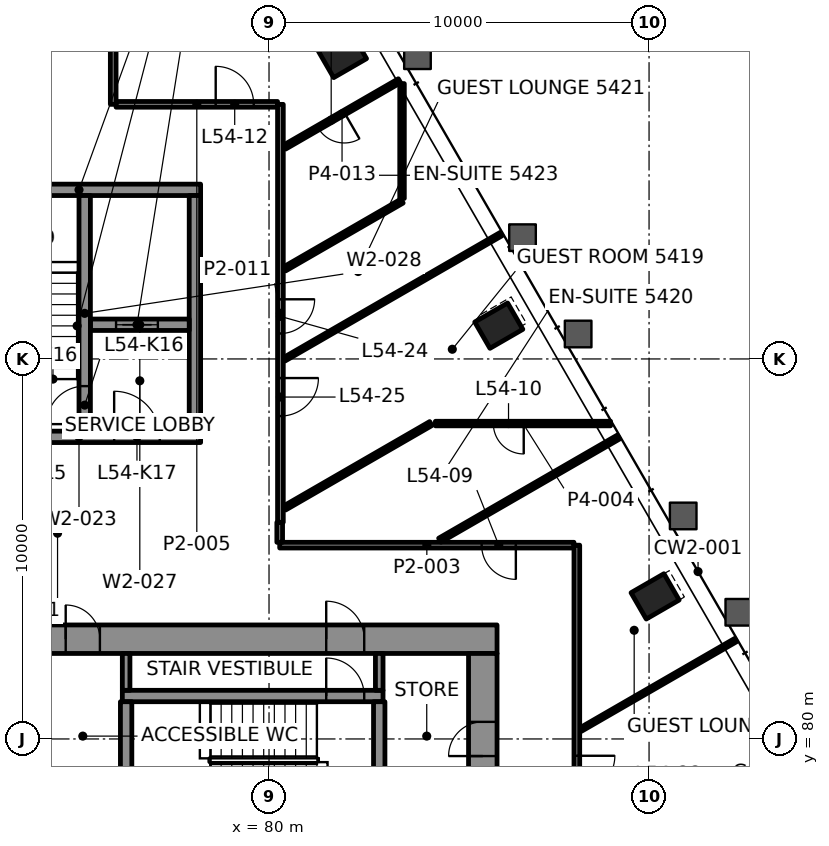
"""IFC4 building model, lengths in metres.
Left out: names, types, materials, properties, quantities, classifications, styles, units other than length and angle.
Written with IfcOpenShell. Run it as: python <this file> out.ifc"""

import sys

from ifc_helpers import new_model, si_unit, direction, frame, frame_2d, origin, origin_2d, place, context, subcontext, project, spatial, rectangle, hollow_rectangle, extrude, element, fill, save


model = new_model("IFC4")
c1 = context("Model", 3, precision=1e-05, world=origin(), true_north=direction((0.0, 1.0)))
c2 = subcontext(c1, "Body", "Model", "MODEL_VIEW")
j1 = project(units=[si_unit("LENGTHUNIT", "METRE"), si_unit("PLANEANGLEUNIT", "RADIAN")], contexts=[c1])
p1 = place(None, origin())
s1 = spatial("IfcSite", under=j1, at=p1, CompositionType="ELEMENT")
p2 = place(p1, origin())
s2 = spatial("IfcBuilding", under=s1, at=p2, CompositionType="ELEMENT")
p3 = place(p2, frame((0.0, 0.0, 229.9)))
s3 = spatial("IfcBuildingStorey", under=s2, at=p3, CompositionType="ELEMENT", Elevation=229.9)
for number, where, z_axis, x_axis in (
    (1, (90.159, 83.752, -0.0), (0.0, 0.0, 1.0), (-0.5, 0.866, 0.0)),
    (2, (86.046, 90.875, -0.0), (0.0, 0.0, 1.0), (-0.5, 0.866, 0.0)),
    (3, (81.933, 97.999, -0.0), (0.0, 0.0, 1.0), (-0.5, 0.866, 0.0)),
):
    element("IfcColumn", number, at=place(p3, frame(where, z_axis=z_axis, x_axis=x_axis)), inside=s3, PredefinedType="COLUMN", context=c2, shape_type="SweptSolid", body=[
        extrude(hollow_rectangle(XDim=0.8, YDim=1.0, WallThickness=0.05, at=origin_2d()), origin(), (0.0, 0.0, 1.0), 3.9),
    ])
p4 = place(p3, frame((64.0, 82.625, 0.0), z_axis=(0.0, 0.0, 1.0), x_axis=(1.0, 0.0, 0.0)))
e4 = element("IfcWall", 4, at=p4, inside=s3, PredefinedType="SHEAR", context=c2, shape_type="SweptSolid", body=[
    extrude(rectangle(XDim=22.0, YDim=0.75, at=frame_2d((11.0, 0.0))), origin(), (0.0, 0.0, 1.0), 3.7),
])
p5 = place(p4, frame((3.695, 0.0, 0.0)))
e5 = element("IfcOpeningElement", 5, at=p5, cuts=e4, PredefinedType="OPENING", context=c2, shape_type="SweptSolid", body=[
    extrude(rectangle(XDim=1.0, YDim=2.1, at=frame_2d((0.5, 1.05))), frame((0.0, 0.385, 0.0), z_axis=(0.0, -1.0, 0.0), x_axis=(1.0, 0.0, 0.0)), (0.0, 0.0, 1.0), 0.77),
])
p6 = place(p4, frame((17.505, 0.0, 0.0)))
e6 = element("IfcOpeningElement", 6, at=p6, cuts=e4, PredefinedType="OPENING", context=c2, shape_type="SweptSolid", body=[
    extrude(rectangle(XDim=1.0, YDim=2.1, at=frame_2d((0.5, 1.05))), frame((0.0, 0.385, 0.0), z_axis=(0.0, -1.0, 0.0), x_axis=(1.0, 0.0, 0.0)), (0.0, 0.0, 1.0), 0.77),
])
p7 = place(p4, frame((10.65, 0.0, 0.0)))
e7 = element("IfcOpeningElement", 7, at=p7, cuts=e4, PredefinedType="OPENING", context=c2, shape_type="SweptSolid", body=[
    extrude(rectangle(XDim=0.9, YDim=2.1, at=frame_2d((0.45, 1.05))), frame((0.0, 0.385, 0.0), z_axis=(0.0, -1.0, 0.0), x_axis=(1.0, 0.0, 0.0)), (0.0, 0.0, 1.0), 0.77),
])
p8 = place(p3, frame((85.625, 67.75, 0.0), z_axis=(0.0, 0.0, 1.0), x_axis=(0.0, 1.0, 0.0)))
e8 = element("IfcWall", 8, at=p8, inside=s3, PredefinedType="SHEAR", context=c2, shape_type="SweptSolid", body=[
    extrude(rectangle(XDim=14.5, YDim=0.75, at=frame_2d((7.25, 0.0))), origin(), (0.0, 0.0, 1.0), 3.7),
])
p9 = place(p8, frame((4.65, 0.0, 0.0)))
e9 = element("IfcOpeningElement", 9, at=p9, cuts=e8, PredefinedType="OPENING", context=c2, shape_type="SweptSolid", body=[
    extrude(rectangle(XDim=1.8, YDim=2.1, at=frame_2d((0.9, 1.05))), frame((0.0, 0.385, 0.0), z_axis=(0.0, -1.0, 0.0), x_axis=(1.0, 0.0, 0.0)), (0.0, 0.0, 1.0), 0.77),
])
p10 = place(p8, frame((11.8, 0.0, 0.0)))
e10 = element("IfcOpeningElement", 10, at=p10, cuts=e8, PredefinedType="OPENING", context=c2, shape_type="SweptSolid", body=[
    extrude(rectangle(XDim=0.9, YDim=2.1, at=frame_2d((0.45, 1.05))), frame((0.0, 0.385, 0.0), z_axis=(0.0, -1.0, 0.0), x_axis=(1.0, 0.0, 0.0)), (0.0, 0.0, 1.0), 0.77),
])
p11 = place(p3, frame((76.14, 81.13, 0.0), z_axis=(0.0, 0.0, 1.0), x_axis=(1.0, 0.0, 0.0)))
e11 = element("IfcWall", 11, at=p11, inside=s3, PredefinedType="SHEAR", context=c2, shape_type="SweptSolid", body=[
    extrude(rectangle(XDim=6.86, YDim=0.3, at=frame_2d((3.43, 0.0))), origin(), (0.0, 0.0, 1.0), 3.7),
])
p12 = place(p11, frame((5.365, 0.0, 0.0)))
e12 = element("IfcOpeningElement", 12, at=p12, cuts=e11, PredefinedType="OPENING", context=c2, shape_type="SweptSolid", body=[
    extrude(rectangle(XDim=1.0, YDim=2.1, at=frame_2d((0.5, 1.05))), frame((0.0, 0.16, 0.0), z_axis=(0.0, -1.0, 0.0), x_axis=(1.0, 0.0, 0.0)), (0.0, 0.0, 1.0), 0.32),
])
for number, where, z_axis, x_axis in (
    (13, (76.24, 77.9, 0.0), (0.0, 0.0, 1.0), (0.0, 1.0, 0.0)),
    (14, (82.9, 77.9, 0.0), (0.0, 0.0, 1.0), (0.0, 1.0, 0.0)),
):
    element("IfcWall", number, at=place(p3, frame(where, z_axis=z_axis, x_axis=x_axis)), inside=s3, PredefinedType="SHEAR", context=c2, shape_type="SweptSolid", body=[
        extrude(rectangle(XDim=3.08, YDim=0.3, at=frame_2d((1.54, 0.0))), origin(), (0.0, 0.0, 1.0), 3.7),
    ])
p13 = place(p3, frame((71.8, 87.95, 0.0), z_axis=(0.0, 0.0, 1.0), x_axis=(1.0, 0.0, 0.0)))
e15 = element("IfcWall", 15, at=p13, inside=s3, PredefinedType="SHEAR", context=c2, shape_type="SweptSolid", body=[
    extrude(rectangle(XDim=6.4, YDim=0.3, at=frame_2d((3.2, 0.0))), origin(), (0.0, 0.0, 1.0), 3.7),
])
p14 = place(p13, frame((1.325, 0.0, 0.0)))
e16 = element("IfcOpeningElement", 16, at=p14, cuts=e15, PredefinedType="OPENING", context=c2, shape_type="SweptSolid", body=[
    extrude(rectangle(XDim=1.0, YDim=2.1, at=frame_2d((0.5, 1.05))), frame((0.0, 0.16, 0.0), z_axis=(0.0, -1.0, 0.0), x_axis=(1.0, 0.0, 0.0)), (0.0, 0.0, 1.0), 0.32),
])
p15 = place(p13, frame((4.125, 0.0, 0.0)))
e17 = element("IfcOpeningElement", 17, at=p15, cuts=e15, PredefinedType="OPENING", context=c2, shape_type="SweptSolid", body=[
    extrude(rectangle(XDim=1.2, YDim=2.1, at=frame_2d((0.6, 1.05))), frame((0.0, 0.16, 0.0), z_axis=(0.0, -1.0, 0.0), x_axis=(1.0, 0.0, 0.0)), (0.0, 0.0, 1.0), 0.32),
])
p16 = place(p3, frame((71.8, 94.45, 0.0), z_axis=(0.0, 0.0, 1.0), x_axis=(1.0, 0.0, 0.0)))
e18 = element("IfcWall", 18, at=p16, inside=s3, PredefinedType="SHEAR", context=c2, shape_type="SweptSolid", body=[
    extrude(rectangle(XDim=6.4, YDim=0.3, at=frame_2d((3.2, 0.0))), origin(), (0.0, 0.0, 1.0), 3.7),
])
p17 = place(p3, frame((78.05, 88.1, 0.0), z_axis=(0.0, 0.0, 1.0), x_axis=(0.0, 1.0, 0.0)))
e19 = element("IfcWall", 19, at=p17, inside=s3, PredefinedType="SHEAR", context=c2, shape_type="SweptSolid", body=[
    extrude(rectangle(XDim=6.2, YDim=0.3, at=frame_2d((3.1, 0.0))), origin(), (0.0, 0.0, 1.0), 3.7),
])
p18 = place(p3, frame((75.3, 90.9, 0.0), z_axis=(0.0, 0.0, 1.0), x_axis=(1.0, 0.0, 0.0)))
e20 = element("IfcWall", 20, at=p18, inside=s3, PredefinedType="SHEAR", context=c2, shape_type="SweptSolid", body=[
    extrude(rectangle(XDim=2.6, YDim=0.3, at=frame_2d((1.3, 0.0))), origin(), (0.0, 0.0, 1.0), 3.7),
])
p19 = place(p18, frame((0.675, 0.0, 0.0)))
e21 = element("IfcOpeningElement", 21, at=p19, cuts=e20, PredefinedType="OPENING", context=c2, shape_type="SweptSolid", body=[
    extrude(rectangle(XDim=1.1, YDim=2.1, at=frame_2d((0.55, 1.05))), frame((0.0, 0.16, 0.0), z_axis=(0.0, -1.0, 0.0), x_axis=(1.0, 0.0, 0.0)), (0.0, 0.0, 1.0), 0.32),
])
p20 = place(p3, frame((75.15, 88.1, 0.0), z_axis=(0.0, 0.0, 1.0), x_axis=(0.0, 1.0, 0.0)))
e22 = element("IfcWall", 22, at=p20, inside=s3, PredefinedType="SHEAR", context=c2, shape_type="SweptSolid", body=[
    extrude(rectangle(XDim=6.2, YDim=0.3, at=frame_2d((3.1, 0.0))), origin(), (0.0, 0.0, 1.0), 3.7),
])
p21 = place(p20, frame((0.185, 0.0, 0.0)))
e23 = element("IfcOpeningElement", 23, at=p21, cuts=e22, PredefinedType="OPENING", context=c2, shape_type="SweptSolid", body=[
    extrude(rectangle(XDim=1.0, YDim=2.1, at=frame_2d((0.5, 1.05))), frame((0.0, 0.16, 0.0), z_axis=(0.0, -1.0, 0.0), x_axis=(1.0, 0.0, 0.0)), (0.0, 0.0, 1.0), 0.32),
])
p22 = place(p3, frame((88.024, 85.1, 0.0), z_axis=(0.0, 0.0, 1.0), x_axis=(-1.0, 0.0, 0.0)))
e24 = element("IfcWall", 24, at=p22, inside=s3, PredefinedType="PARTITIONING", context=c2, shape_type="SweptSolid", body=[
    extrude(rectangle(XDim=7.744, YDim=0.15, at=frame_2d((3.872, 0.0))), origin(), (0.0, 0.0, 1.0), 3.1),
])
p23 = place(p22, frame((1.53, 0.0, 0.0)))
e25 = element("IfcOpeningElement", 25, at=p23, cuts=e24, PredefinedType="OPENING", context=c2, shape_type="SweptSolid", body=[
    extrude(rectangle(XDim=0.9, YDim=2.1, at=frame_2d((0.45, 1.05))), frame((0.0, 0.085, 0.0), z_axis=(0.0, -1.0, 0.0), x_axis=(1.0, 0.0, 0.0)), (0.0, 0.0, 1.0), 0.17),
])
p24 = place(p3, frame((88.988, 88.3, 0.0), z_axis=(0.0, 0.0, 1.0), x_axis=(-1.0, 0.0, 0.0)))
e26 = element("IfcWall", 26, at=p24, inside=s3, PredefinedType="PARTITIONING", context=c2, shape_type="SweptSolid", body=[
    extrude(rectangle(XDim=4.61, YDim=0.12, at=frame_2d((2.305, 0.0))), origin(), (0.0, 0.0, 1.0), 3.022),
])
p25 = place(p24, frame((2.286, 0.0, 0.0)))
e27 = element("IfcOpeningElement", 27, at=p25, cuts=e26, PredefinedType="OPENING", context=c2, shape_type="SweptSolid", body=[
    extrude(rectangle(XDim=0.8, YDim=2.1, at=frame_2d((0.4, 1.05))), frame((0.0, 0.07, 0.0), z_axis=(0.0, -1.0, 0.0), x_axis=(1.0, 0.0, 0.0)), (0.0, 0.0, 1.0), 0.14),
])
p26 = place(p3, frame((75.975, 96.7, 0.0), z_axis=(0.0, 0.0, 1.0), x_axis=(1.0, 0.0, 0.0)))
e28 = element("IfcWall", 28, at=p26, inside=s3, PredefinedType="PARTITIONING", context=c2, shape_type="SweptSolid", body=[
    extrude(rectangle(XDim=4.25, YDim=0.15, at=frame_2d((2.125, 0.0))), origin(), (0.0, 0.0, 1.0), 3.1),
])
p27 = place(p26, frame((2.622, 0.0, 0.0)))
e29 = element("IfcOpeningElement", 29, at=p27, cuts=e28, PredefinedType="OPENING", context=c2, shape_type="SweptSolid", body=[
    extrude(rectangle(XDim=1.0, YDim=2.1, at=frame_2d((0.5, 1.05))), frame((0.0, 0.085, 0.0), z_axis=(0.0, -1.0, 0.0), x_axis=(1.0, 0.0, 0.0)), (0.0, 0.0, 1.0), 0.17),
])
p28 = place(p3, frame((88.201, 80.248, 0.0), z_axis=(0.0, 0.0, 1.0), x_axis=(0.866032742664, 0.499987288472, 0.0)))
e30 = element("IfcWall", 30, at=p28, inside=s3, PredefinedType="PARTITIONING", context=c2, shape_type="SweptSolid", body=[
    extrude(rectangle(XDim=4.708, YDim=0.1, at=frame_2d((2.354, 0.0))), origin(), (0.0, 0.0, 1.0), 3.022),
])
p29 = place(p3, frame((84.493, 85.23, 0.0), z_axis=(0.0, 0.0, 1.0), x_axis=(0.866020042254, 0.500009286329, 0.0)))
e31 = element("IfcWall", 31, at=p29, inside=s3, PredefinedType="PARTITIONING", context=c2, shape_type="SweptSolid", body=[
    extrude(rectangle(XDim=5.428, YDim=0.12, at=frame_2d((2.714, 0.0))), origin(), (0.0, 0.0, 1.0), 3.022),
])
p30 = place(p3, frame((80.41, 86.078, 0.0), z_axis=(0.0, 0.0, 1.0), x_axis=(0.866033721197, 0.499985593543, 0.0)))
e32 = element("IfcWall", 32, at=p30, inside=s3, PredefinedType="PARTITIONING", context=c2, shape_type="SweptSolid", body=[
    extrude(rectangle(XDim=4.444, YDim=0.12, at=frame_2d((2.222, 0.0))), origin(), (0.0, 0.0, 1.0), 3.1),
])
p31 = place(p3, frame((80.401, 89.991, 0.0), z_axis=(0.0, 0.0, 1.0), x_axis=(0.866025831117, 0.499999259837, 0.0)))
e33 = element("IfcWall", 33, at=p31, inside=s3, PredefinedType="PARTITIONING", context=c2, shape_type="SweptSolid", body=[
    extrude(rectangle(XDim=6.591, YDim=0.1, at=frame_2d((3.296, 0.0))), origin(), (0.0, 0.0, 1.0), 3.022),
])
p32 = place(p3, frame((80.41, 92.37, 0.0), z_axis=(0.0, 0.0, 1.0), x_axis=(0.866028357664, 0.499994883695, 0.0)))
e34 = element("IfcWall", 34, at=p32, inside=s3, PredefinedType="PARTITIONING", context=c2, shape_type="SweptSolid", body=[
    extrude(rectangle(XDim=3.568, YDim=0.12, at=frame_2d((1.784, 0.0))), origin(), (0.0, 0.0, 1.0), 3.1),
])
p33 = place(p3, frame((83.433, 97.321, 0.0), z_axis=(0.0, 0.0, 1.0), x_axis=(-0.866022549299, -0.50000494408, 0.0)))
e35 = element("IfcWall", 35, at=p33, inside=s3, PredefinedType="PARTITIONING", context=c2, shape_type="SweptSolid", body=[
    extrude(rectangle(XDim=3.491, YDim=0.12, at=frame_2d((1.746, 0.0))), origin(), (0.0, 0.0, 1.0), 3.022),
])
p34 = place(p33, frame((1.676, 0.0, 0.0)))
e36 = element("IfcOpeningElement", 36, at=p34, cuts=e35, PredefinedType="OPENING", context=c2, shape_type="SweptSolid", body=[
    extrude(rectangle(XDim=0.8, YDim=2.1, at=frame_2d((0.4, 1.05))), frame((0.0, 0.07, 0.0), z_axis=(0.0, -1.0, 0.0), x_axis=(1.0, 0.0, 0.0)), (0.0, 0.0, 1.0), 0.14),
])
p35 = place(p3, frame((88.1, 85.1, 0.0), z_axis=(0.0, 0.0, 1.0), x_axis=(0.0, -1.0, 0.0)))
e37 = element("IfcWall", 37, at=p35, inside=s3, PredefinedType="PARTITIONING", context=c2, shape_type="SweptSolid", body=[
    extrude(rectangle(XDim=16.624, YDim=0.15, at=frame_2d((8.312, 0.0))), origin(), (0.0, 0.0, 1.0), 3.1),
])
p36 = place(p35, frame((5.542, 0.0, 0.0)))
e38 = element("IfcOpeningElement", 38, at=p36, cuts=e37, PredefinedType="OPENING", context=c2, shape_type="SweptSolid", body=[
    extrude(rectangle(XDim=1.0, YDim=2.1, at=frame_2d((0.5, 1.05))), frame((0.0, 0.085, 0.0), z_axis=(0.0, -1.0, 0.0), x_axis=(1.0, 0.0, 0.0)), (0.0, 0.0, 1.0), 0.17),
])
p37 = place(p35, frame((14.558, 0.0, 0.0)))
e39 = element("IfcOpeningElement", 39, at=p37, cuts=e37, PredefinedType="OPENING", context=c2, shape_type="SweptSolid", body=[
    extrude(rectangle(XDim=1.0, YDim=2.1, at=frame_2d((0.5, 1.05))), frame((0.0, 0.085, 0.0), z_axis=(0.0, -1.0, 0.0), x_axis=(1.0, 0.0, 0.0)), (0.0, 0.0, 1.0), 0.17),
])
p38 = place(p3, frame((83.5, 94.224, 0.0), z_axis=(0.0, 0.0, 1.0), x_axis=(0.0, 1.0, 0.0)))
e40 = element("IfcWall", 40, at=p38, inside=s3, PredefinedType="PARTITIONING", context=c2, shape_type="SweptSolid", body=[
    extrude(rectangle(XDim=3.022, YDim=0.12, at=frame_2d((1.511, 0.0))), origin(), (0.0, 0.0, 1.0), 3.022),
])
p39 = place(p3, frame((80.3, 96.699, 0.0), z_axis=(0.0, 0.0, 1.0), x_axis=(0.0, -1.0, 0.0)))
e41 = element("IfcWall", 41, at=p39, inside=s3, PredefinedType="PARTITIONING", context=c2, shape_type="SweptSolid", body=[
    extrude(rectangle(XDim=10.999, YDim=0.15, at=frame_2d((5.5, 0.0))), origin(), (0.0, 0.0, 1.0), 3.1),
])
p40 = place(p39, frame((5.129, 0.0, 0.0)))
e42 = element("IfcOpeningElement", 42, at=p40, cuts=e41, PredefinedType="OPENING", context=c2, shape_type="SweptSolid", body=[
    extrude(rectangle(XDim=0.9, YDim=2.1, at=frame_2d((0.45, 1.05))), frame((0.0, 0.085, 0.0), z_axis=(0.0, -1.0, 0.0), x_axis=(1.0, 0.0, 0.0)), (0.0, 0.0, 1.0), 0.17),
])
p41 = place(p39, frame((7.202, 0.0, 0.0)))
e43 = element("IfcOpeningElement", 43, at=p41, cuts=e41, PredefinedType="OPENING", context=c2, shape_type="SweptSolid", body=[
    extrude(rectangle(XDim=1.0, YDim=2.1, at=frame_2d((0.5, 1.05))), frame((0.0, 0.085, 0.0), z_axis=(0.0, -1.0, 0.0), x_axis=(1.0, 0.0, 0.0)), (0.0, 0.0, 1.0), 0.17),
])
p42 = place(p3, frame((80.281, 85.175, 0.0), z_axis=(0.0, 0.0, 1.0), x_axis=(0.0, 1.0, 0.0)))
e44 = element("IfcWall", 44, at=p42, inside=s3, PredefinedType="PARTITIONING", context=c2, shape_type="SweptSolid", body=[
    extrude(rectangle(XDim=0.525, YDim=0.15, at=frame_2d((0.262, 0.0))), origin(), (0.0, 0.0, 1.0), 3.1),
])
p43 = place(p3, frame((75.9, 96.7, 0.0), z_axis=(0.0, 0.0, 1.0), x_axis=(0.0, 1.0, 0.0)))
e45 = element("IfcWall", 45, at=p43, inside=s3, PredefinedType="PARTITIONING", context=c2, shape_type="SweptSolid", body=[
    extrude(rectangle(XDim=5.673, YDim=0.15, at=frame_2d((2.836, 0.0))), origin(), (0.0, 0.0, 1.0), 3.1),
])
for number, where, z_axis, x_axis in (
    (46, (76.24, 81.28, 0.0), (0.0, 0.0, 1.0), (0.0, 1.0, 0.0)),
    (47, (82.9, 81.28, 0.0), (0.0, 0.0, 1.0), (0.0, 1.0, 0.0)),
):
    element("IfcWall", number, at=place(p3, frame(where, z_axis=z_axis, x_axis=x_axis)), inside=s3, PredefinedType="PARTITIONING", context=c2, shape_type="SweptSolid", body=[
        extrude(rectangle(XDim=0.97, YDim=0.2, at=frame_2d((0.485, 0.0))), origin(), (0.0, 0.0, 1.0), 3.7),
    ])
p44 = place(p23, origin())
e48 = element("IfcDoor", 48, at=p44, inside=s3, OperationType="SINGLE_SWING_RIGHT", PredefinedType="DOOR", context=c2, shape_type="SweptSolid", body=[
    extrude(rectangle(XDim=0.9, YDim=2.1, at=frame_2d((0.45, 1.05))), frame((0.0, 0.025, 0.0), z_axis=(0.0, -1.0, 0.0), x_axis=(1.0, 0.0, 0.0)), (0.0, 0.0, 1.0), 0.05),
])
fill(e25, e48)
p45 = place(p25, origin())
e49 = element("IfcDoor", 49, at=p45, inside=s3, OperationType="SINGLE_SWING_RIGHT", PredefinedType="DOOR", context=c2, shape_type="SweptSolid", body=[
    extrude(rectangle(XDim=0.8, YDim=2.1, at=frame_2d((0.4, 1.05))), frame((0.0, 0.025, 0.0), z_axis=(0.0, -1.0, 0.0), x_axis=(1.0, 0.0, 0.0)), (0.0, 0.0, 1.0), 0.05),
])
fill(e27, e49)
p46 = place(p27, origin())
e50 = element("IfcDoor", 50, at=p46, inside=s3, OperationType="SINGLE_SWING_LEFT", PredefinedType="DOOR", context=c2, shape_type="SweptSolid", body=[
    extrude(rectangle(XDim=1.0, YDim=2.1, at=frame_2d((0.5, 1.05))), frame((0.0, 0.025, 0.0), z_axis=(0.0, -1.0, 0.0), x_axis=(1.0, 0.0, 0.0)), (0.0, 0.0, 1.0), 0.05),
])
fill(e29, e50)
p47 = place(p34, origin())
e51 = element("IfcDoor", 51, at=p47, inside=s3, OperationType="SINGLE_SWING_LEFT", PredefinedType="DOOR", context=c2, shape_type="SweptSolid", body=[
    extrude(rectangle(XDim=0.8, YDim=2.1, at=frame_2d((0.4, 1.05))), frame((0.0, 0.025, 0.0), z_axis=(0.0, -1.0, 0.0), x_axis=(1.0, 0.0, 0.0)), (0.0, 0.0, 1.0), 0.05),
])
fill(e36, e51)
p48 = place(p36, origin())
e52 = element("IfcDoor", 52, at=p48, inside=s3, OperationType="SINGLE_SWING_RIGHT", PredefinedType="DOOR", context=c2, shape_type="SweptSolid", body=[
    extrude(rectangle(XDim=1.0, YDim=2.1, at=frame_2d((0.5, 1.05))), frame((0.0, 0.025, 0.0), z_axis=(0.0, -1.0, 0.0), x_axis=(1.0, 0.0, 0.0)), (0.0, 0.0, 1.0), 0.05),
])
fill(e38, e52)
p49 = place(p40, origin())
e53 = element("IfcDoor", 53, at=p49, inside=s3, OperationType="SINGLE_SWING_LEFT", PredefinedType="DOOR", context=c2, shape_type="SweptSolid", body=[
    extrude(rectangle(XDim=0.9, YDim=2.1, at=frame_2d((0.45, 1.05))), frame((0.0, 0.025, 0.0), z_axis=(0.0, -1.0, 0.0), x_axis=(1.0, 0.0, 0.0)), (0.0, 0.0, 1.0), 0.05),
])
fill(e42, e53)
p50 = place(p41, origin())
e54 = element("IfcDoor", 54, at=p50, inside=s3, OperationType="SINGLE_SWING_LEFT", PredefinedType="DOOR", context=c2, shape_type="SweptSolid", body=[
    extrude(rectangle(XDim=1.0, YDim=2.1, at=frame_2d((0.5, 1.05))), frame((0.0, 0.025, 0.0), z_axis=(0.0, -1.0, 0.0), x_axis=(1.0, 0.0, 0.0)), (0.0, 0.0, 1.0), 0.05),
])
fill(e43, e54)
p51 = place(p3, origin())
p52 = place(p51, frame((85.776, 93.954, 0.15), z_axis=(0.0, 0.0, 1.0), x_axis=(-0.5, 0.866025, 0.0)))
p53 = place(p52, origin())
e55 = element("IfcWindow", 55, at=p53, inside=s3, PartitioningType="SINGLE_PANEL", PredefinedType="WINDOW", context=c2, shape_type="SweptSolid", body=[
    extrude(rectangle(XDim=2.667, YDim=3.55, at=frame_2d((1.333, 1.775))), frame((0.0, 0.03, 0.0), z_axis=(0.0, -1.0, 0.0), x_axis=(1.0, 0.0, 0.0)), (0.0, 0.0, 1.0), 0.06),
])
p54 = place(p19, origin())
e56 = element("IfcDoor", 56, at=p54, inside=s3, OperationType="DOUBLE_DOOR_SLIDING", PredefinedType="DOOR", context=c2, shape_type="SweptSolid", body=[
    extrude(rectangle(XDim=1.1, YDim=2.1, at=frame_2d((0.55, 1.05))), frame((0.0, 0.025, 0.0), z_axis=(0.0, -1.0, 0.0), x_axis=(1.0, 0.0, 0.0)), (0.0, 0.0, 1.0), 0.05),
])
fill(e21, e56)
p55 = place(p12, origin())
e57 = element("IfcDoor", 57, at=p55, inside=s3, OperationType="SINGLE_SWING_RIGHT", PredefinedType="DOOR", context=c2, shape_type="SweptSolid", body=[
    extrude(rectangle(XDim=1.0, YDim=2.1, at=frame_2d((0.5, 1.05))), frame((0.0, 0.025, 0.0), z_axis=(0.0, -1.0, 0.0), x_axis=(1.0, 0.0, 0.0)), (0.0, 0.0, 1.0), 0.05),
])
fill(e12, e57)
p56 = place(p6, origin())
e58 = element("IfcDoor", 58, at=p56, inside=s3, OperationType="SINGLE_SWING_LEFT", PredefinedType="DOOR", context=c2, shape_type="SweptSolid", body=[
    extrude(rectangle(XDim=1.0, YDim=2.1, at=frame_2d((0.5, 1.05))), frame((0.0, 0.095, 0.0), z_axis=(0.0, -1.0, 0.0), x_axis=(1.0, 0.0, 0.0)), (0.0, 0.0, 1.0), 0.19),
])
fill(e6, e58)
p57 = place(p21, origin())
e59 = element("IfcDoor", 59, at=p57, inside=s3, OperationType="SINGLE_SWING_LEFT", PredefinedType="DOOR", context=c2, shape_type="SweptSolid", body=[
    extrude(rectangle(XDim=1.0, YDim=2.1, at=frame_2d((0.5, 1.05))), frame((0.0, 0.025, 0.0), z_axis=(0.0, -1.0, 0.0), x_axis=(1.0, 0.0, 0.0)), (0.0, 0.0, 1.0), 0.05),
])
fill(e23, e59)
p58 = place(p15, origin())
e60 = element("IfcDoor", 60, at=p58, inside=s3, OperationType="SINGLE_SWING_RIGHT", PredefinedType="DOOR", context=c2, shape_type="SweptSolid", body=[
    extrude(rectangle(XDim=1.2, YDim=2.1, at=frame_2d((0.6, 1.05))), frame((0.0, 0.025, 0.0), z_axis=(0.0, -1.0, 0.0), x_axis=(1.0, 0.0, 0.0)), (0.0, 0.0, 1.0), 0.05),
])
fill(e17, e60)
p59 = place(p7, origin())
e61 = element("IfcDoor", 61, at=p59, inside=s3, OperationType="SINGLE_SWING_LEFT", PredefinedType="DOOR", context=c2, shape_type="SweptSolid", body=[
    extrude(rectangle(XDim=0.9, YDim=2.1, at=frame_2d((0.45, 1.05))), frame((0.0, 0.095, 0.0), z_axis=(0.0, -1.0, 0.0), x_axis=(1.0, 0.0, 0.0)), (0.0, 0.0, 1.0), 0.19),
])
fill(e7, e61)
p60 = place(p10, origin())
e62 = element("IfcDoor", 62, at=p60, inside=s3, OperationType="SINGLE_SWING_RIGHT", PredefinedType="DOOR", context=c2, shape_type="SweptSolid", body=[
    extrude(rectangle(XDim=0.9, YDim=2.1, at=frame_2d((0.45, 1.05))), frame((0.0, 0.095, 0.0), z_axis=(0.0, -1.0, 0.0), x_axis=(1.0, 0.0, 0.0)), (0.0, 0.0, 1.0), 0.19),
])
fill(e10, e62)
save(model, sys.argv[1])
